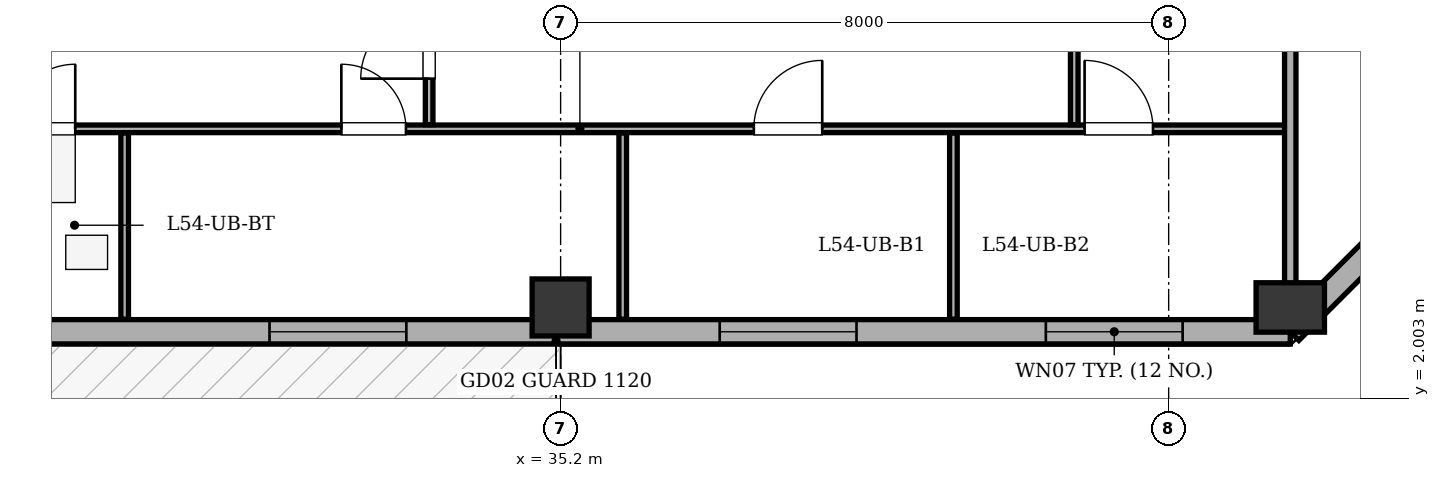
"""IFC4 building model, lengths in metres.
Left out: names, types, materials, properties, quantities, classifications, styles, units other than length and angle.
Written with IfcOpenShell. Run it as: python <this file> out.ifc"""

import sys

from ifc_helpers import new_model, si_unit, direction, frame, frame_2d, origin, origin_2d, place, context, subcontext, project, spatial, rectangle, extrude, element, fill, save


model = new_model("IFC4")
c1 = context("Model", 3, precision=1e-05, world=origin(), true_north=direction((0.0, 1.0)))
c2 = subcontext(c1, "Body", "Model", "MODEL_VIEW")
j1 = project(units=[si_unit("LENGTHUNIT", "METRE"), si_unit("PLANEANGLEUNIT", "RADIAN")], contexts=[c1])
p1 = place(None, origin())
s1 = spatial("IfcSite", under=j1, at=p1, CompositionType="ELEMENT")
p2 = place(p1, origin())
s2 = spatial("IfcBuilding", under=s1, at=p2, CompositionType="ELEMENT")
p3 = place(p2, frame((0.0, 0.0, 210.9)))
s3 = spatial("IfcBuildingStorey", under=s2, at=p3, CompositionType="ELEMENT", Elevation=210.9)
p4 = place(p3, frame((35.2, 3.2, 0.0), z_axis=(0.0, 0.0, 1.0), x_axis=(1.0, 0.0, 0.0)))
e1 = element("IfcColumn", 1, at=p4, inside=s3, PredefinedType="COLUMN", context=c2, shape_type="SweptSolid", body=[
    extrude(rectangle(XDim=0.75, YDim=0.75, at=origin_2d()), origin(), (0.0, 0.0, 1.0), 3.4),
])
p5 = place(p3, frame((44.8, 3.2, 0.0), z_axis=(0.0, 0.0, 1.0), x_axis=(1.0, 0.0, 0.0)))
e2 = element("IfcColumn", 2, at=p5, inside=s3, PredefinedType="COLUMN", context=c2, shape_type="SweptSolid", body=[
    extrude(rectangle(XDim=0.65, YDim=0.9, at=origin_2d()), origin(), (0.0, 0.0, 1.0), 3.4),
])
p6 = place(p3, frame((44.8, 2.88, 0.0), z_axis=(0.0, 0.0, 1.0), x_axis=(-1.0, 0.0, 0.0)))
e3 = element("IfcWall", 3, at=p6, inside=s3, PredefinedType="STANDARD", context=c2, shape_type="SweptSolid", body=[
    extrude(rectangle(XDim=36.0, YDim=0.32, at=frame_2d((18.0, 0.0))), origin(), (0.0, 0.0, 1.0), 2.725),
])
p7 = place(p6, frame((20.1, 0.0, 0.0)))
e4 = element("IfcOpeningElement", 4, at=p7, cuts=e3, PredefinedType="OPENING", context=c2, shape_type="SweptSolid", body=[
    extrude(rectangle(XDim=1.0, YDim=2.02, at=frame_2d((0.5, 1.01))), frame((0.0, 0.17, 0.0), z_axis=(0.0, -1.0, 0.0), x_axis=(1.0, 0.0, 0.0)), (0.0, 0.0, 1.0), 0.34),
])
p8 = place(p6, frame((1.416, 0.0, 0.75)))
e5 = element("IfcOpeningElement", 5, at=p8, cuts=e3, PredefinedType="OPENING", context=c2, shape_type="SweptSolid", body=[
    extrude(rectangle(XDim=1.8, YDim=1.7, at=frame_2d((0.9, 0.85))), frame((0.0, 0.17, 0.0), z_axis=(0.0, -1.0, 0.0), x_axis=(1.0, 0.0, 0.0)), (0.0, 0.0, 1.0), 0.34),
])
p9 = place(p6, frame((5.707, 0.0, 0.75)))
e6 = element("IfcOpeningElement", 6, at=p9, cuts=e3, PredefinedType="OPENING", context=c2, shape_type="SweptSolid", body=[
    extrude(rectangle(XDim=1.8, YDim=1.7, at=frame_2d((0.9, 0.85))), frame((0.0, 0.17, 0.0), z_axis=(0.0, -1.0, 0.0), x_axis=(1.0, 0.0, 0.0)), (0.0, 0.0, 1.0), 0.34),
])
p10 = place(p6, frame((11.63, 0.0, 0.75)))
e7 = element("IfcOpeningElement", 7, at=p10, cuts=e3, PredefinedType="OPENING", context=c2, shape_type="SweptSolid", body=[
    extrude(rectangle(XDim=1.8, YDim=1.7, at=frame_2d((0.9, 0.85))), frame((0.0, 0.17, 0.0), z_axis=(0.0, -1.0, 0.0), x_axis=(1.0, 0.0, 0.0)), (0.0, 0.0, 1.0), 0.34),
])
p11 = place(p6, frame((27.712, 0.0, 0.75)))
e8 = element("IfcOpeningElement", 8, at=p11, cuts=e3, PredefinedType="OPENING", context=c2, shape_type="SweptSolid", body=[
    extrude(rectangle(XDim=1.8, YDim=1.7, at=frame_2d((0.9, 0.85))), frame((0.0, 0.17, 0.0), z_axis=(0.0, -1.0, 0.0), x_axis=(1.0, 0.0, 0.0)), (0.0, 0.0, 1.0), 0.34),
])
p12 = place(p6, frame((22.367, 0.0, 0.75)))
e9 = element("IfcOpeningElement", 9, at=p12, cuts=e3, PredefinedType="OPENING", context=c2, shape_type="SweptSolid", body=[
    extrude(rectangle(XDim=0.75, YDim=1.45, at=frame_2d((0.375, 0.725))), frame((0.0, 0.17, 0.0), z_axis=(0.0, -1.0, 0.0), x_axis=(1.0, 0.0, 0.0)), (0.0, 0.0, 1.0), 0.34),
])
p13 = place(p3, frame((49.12, 7.2, 0.0), z_axis=(0.0, 0.0, 1.0), x_axis=(-0.707106781187, -0.707106781187, 0.0)))
e10 = element("IfcWall", 10, at=p13, inside=s3, PredefinedType="STANDARD", context=c2, shape_type="SweptSolid", body=[
    extrude(rectangle(XDim=6.11, YDim=0.32, at=frame_2d((3.055, 0.0))), origin(), (0.0, 0.0, 1.0), 2.725),
])
p14 = place(p13, frame((2.355, 0.0, 0.75)))
e11 = element("IfcOpeningElement", 11, at=p14, cuts=e10, PredefinedType="OPENING", context=c2, shape_type="SweptSolid", body=[
    extrude(rectangle(XDim=1.4, YDim=1.65, at=frame_2d((0.7, 0.825))), frame((0.0, 0.17, 0.0), z_axis=(0.0, -1.0, 0.0), x_axis=(1.0, 0.0, 0.0)), (0.0, 0.0, 1.0), 0.34),
])
p15 = place(p3, frame((27.314, 5.55, 0.0), z_axis=(0.0, 0.0, 1.0), x_axis=(1.0, 0.0, 0.0)))
e12 = element("IfcWall", 12, at=p15, inside=s3, PredefinedType="PARTITIONING", context=c2, shape_type="SweptSolid", body=[
    extrude(rectangle(XDim=17.526, YDim=0.1, at=frame_2d((8.763, 0.0))), origin(), (0.0, 0.0, 1.0), 3.1),
])
p16 = place(p15, frame((0.65, 0.0, 0.0)))
e13 = element("IfcOpeningElement", 13, at=p16, cuts=e12, PredefinedType="OPENING", context=c2, shape_type="SweptSolid", body=[
    extrude(rectangle(XDim=0.85, YDim=2.05, at=frame_2d((0.425, 1.025))), frame((0.0, 0.06, 0.0), z_axis=(0.0, -1.0, 0.0), x_axis=(1.0, 0.0, 0.0)), (0.0, 0.0, 1.0), 0.12),
])
p17 = place(p15, frame((5.001, 0.0, 0.0)))
e14 = element("IfcOpeningElement", 14, at=p17, cuts=e12, PredefinedType="OPENING", context=c2, shape_type="SweptSolid", body=[
    extrude(rectangle(XDim=0.85, YDim=2.05, at=frame_2d((0.425, 1.025))), frame((0.0, 0.06, 0.0), z_axis=(0.0, -1.0, 0.0), x_axis=(1.0, 0.0, 0.0)), (0.0, 0.0, 1.0), 0.12),
])
p18 = place(p15, frame((10.428, 0.0, 0.0)))
e15 = element("IfcOpeningElement", 15, at=p18, cuts=e12, PredefinedType="OPENING", context=c2, shape_type="SweptSolid", body=[
    extrude(rectangle(XDim=0.9, YDim=2.05, at=frame_2d((0.45, 1.025))), frame((0.0, 0.06, 0.0), z_axis=(0.0, -1.0, 0.0), x_axis=(1.0, 0.0, 0.0)), (0.0, 0.0, 1.0), 0.12),
])
p19 = place(p15, frame((14.78, 0.0, 0.0)))
e16 = element("IfcOpeningElement", 16, at=p19, cuts=e12, PredefinedType="OPENING", context=c2, shape_type="SweptSolid", body=[
    extrude(rectangle(XDim=0.9, YDim=2.05, at=frame_2d((0.45, 1.025))), frame((0.0, 0.06, 0.0), z_axis=(0.0, -1.0, 0.0), x_axis=(1.0, 0.0, 0.0)), (0.0, 0.0, 1.0), 0.12),
])
p20 = place(p3, frame((41.958, 5.605, 0.0), z_axis=(0.0, 0.0, 1.0), x_axis=(0.0, 1.0, 0.0)))
e17 = element("IfcWall", 17, at=p20, inside=s3, PredefinedType="PARTITIONING", context=c2, shape_type="SweptSolid", body=[
    extrude(rectangle(XDim=12.695, YDim=0.1, at=frame_2d((6.348, 0.0))), origin(), (0.0, 0.0, 1.0), 2.725),
])
p21 = place(p20, frame((5.91, 0.0, 0.0)))
e18 = element("IfcOpeningElement", 18, at=p21, cuts=e17, PredefinedType="OPENING", context=c2, shape_type="SweptSolid", body=[
    extrude(rectangle(XDim=0.9, YDim=2.05, at=frame_2d((0.45, 1.025))), frame((0.0, 0.06, 0.0), z_axis=(0.0, -1.0, 0.0), x_axis=(1.0, 0.0, 0.0)), (0.0, 0.0, 1.0), 0.12),
])
p22 = place(p3, frame((33.47, 5.605, 0.0), z_axis=(0.0, 0.0, 1.0), x_axis=(0.0, 1.0, 0.0)))
e19 = element("IfcWall", 19, at=p22, inside=s3, PredefinedType="PARTITIONING", context=c2, shape_type="SweptSolid", body=[
    extrude(rectangle(XDim=12.695, YDim=0.1, at=frame_2d((6.348, 0.0))), origin(), (0.0, 0.0, 1.0), 2.725),
])
p23 = place(p22, frame((0.605, 0.0, 0.0)))
e20 = element("IfcOpeningElement", 20, at=p23, cuts=e19, PredefinedType="OPENING", context=c2, shape_type="SweptSolid", body=[
    extrude(rectangle(XDim=0.9, YDim=2.05, at=frame_2d((0.45, 1.025))), frame((0.0, 0.06, 0.0), z_axis=(0.0, -1.0, 0.0), x_axis=(1.0, 0.0, 0.0)), (0.0, 0.0, 1.0), 0.12),
])
for number, where, z_axis, x_axis in (
    (21, (29.464, 3.045, 0.0), (0.0, 0.0, 1.0), (0.0, 1.0, 0.0)),
    (22, (36.017, 3.045, 0.0), (0.0, 0.0, 1.0), (0.0, 1.0, 0.0)),
):
    element("IfcWall", number, at=place(p3, frame(where, z_axis=z_axis, x_axis=x_axis)), inside=s3, PredefinedType="PARTITIONING", context=c2, shape_type="SweptSolid", body=[
        extrude(rectangle(XDim=2.45, YDim=0.1, at=frame_2d((1.225, 0.0))), origin(), (0.0, 0.0, 1.0), 3.1),
    ])
p24 = place(p3, frame((40.368, 3.045, 0.0), z_axis=(0.0, 0.0, 1.0), x_axis=(0.0, 1.0, 0.0)))
e23 = element("IfcWall", 23, at=p24, inside=s3, PredefinedType="PARTITIONING", context=c2, shape_type="SweptSolid", body=[
    extrude(rectangle(XDim=2.45, YDim=0.1, at=frame_2d((1.225, 0.0))), origin(), (0.0, 0.0, 1.0), 2.725),
])
p25 = place(p3, frame((44.8, 3.045, 0.0), z_axis=(0.0, 0.0, 1.0), x_axis=(0.0, 1.0, 0.0)))
e24 = element("IfcWall", 24, at=p25, inside=s3, PredefinedType="PARTITIONING", context=c2, shape_type="SweptSolid", body=[
    extrude(rectangle(XDim=15.255, YDim=0.15, at=frame_2d((7.627, 0.0))), origin(), (0.0, 0.0, 1.0), 3.1),
])
p26 = place(p8, origin())
e25 = element("IfcWindow", 25, at=p26, inside=s3, PartitioningType="SINGLE_PANEL", PredefinedType="WINDOW", context=c2, shape_type="SweptSolid", body=[
    extrude(rectangle(XDim=1.8, YDim=1.7, at=frame_2d((0.9, 0.85))), frame((0.0, -0.01, 0.0), z_axis=(0.0, -1.0, 0.0), x_axis=(1.0, 0.0, 0.0)), (0.0, 0.0, 1.0), 0.06),
])
fill(e5, e25)
p27 = place(p9, origin())
e26 = element("IfcWindow", 26, at=p27, inside=s3, PartitioningType="SINGLE_PANEL", PredefinedType="WINDOW", context=c2, shape_type="SweptSolid", body=[
    extrude(rectangle(XDim=1.8, YDim=1.7, at=frame_2d((0.9, 0.85))), frame((0.0, -0.01, 0.0), z_axis=(0.0, -1.0, 0.0), x_axis=(1.0, 0.0, 0.0)), (0.0, 0.0, 1.0), 0.06),
])
fill(e6, e26)
p28 = place(p10, origin())
e27 = element("IfcWindow", 27, at=p28, inside=s3, PartitioningType="SINGLE_PANEL", PredefinedType="WINDOW", context=c2, shape_type="SweptSolid", body=[
    extrude(rectangle(XDim=1.8, YDim=1.7, at=frame_2d((0.9, 0.85))), frame((0.0, -0.01, 0.0), z_axis=(0.0, -1.0, 0.0), x_axis=(1.0, 0.0, 0.0)), (0.0, 0.0, 1.0), 0.06),
])
fill(e7, e27)
p29 = place(p23, origin())
e28 = element("IfcDoor", 28, at=p29, inside=s3, OperationType="SINGLE_SWING_LEFT", PredefinedType="DOOR", context=c2, shape_type="SweptSolid", body=[
    extrude(rectangle(XDim=0.9, YDim=2.05, at=frame_2d((0.45, 1.025))), frame((0.0, 0.025, 0.0), z_axis=(0.0, -1.0, 0.0), x_axis=(1.0, 0.0, 0.0)), (0.0, 0.0, 1.0), 0.05),
])
fill(e20, e28)
p30 = place(p16, origin())
e29 = element("IfcDoor", 29, at=p30, inside=s3, OperationType="SINGLE_SWING_RIGHT", PredefinedType="DOOR", context=c2, shape_type="SweptSolid", body=[
    extrude(rectangle(XDim=0.85, YDim=2.05, at=frame_2d((0.425, 1.025))), frame((0.0, 0.025, 0.0), z_axis=(0.0, -1.0, 0.0), x_axis=(1.0, 0.0, 0.0)), (0.0, 0.0, 1.0), 0.05),
])
fill(e13, e29)
p31 = place(p17, origin())
e30 = element("IfcDoor", 30, at=p31, inside=s3, OperationType="SINGLE_SWING_LEFT", PredefinedType="DOOR", context=c2, shape_type="SweptSolid", body=[
    extrude(rectangle(XDim=0.85, YDim=2.05, at=frame_2d((0.425, 1.025))), frame((0.0, 0.025, 0.0), z_axis=(0.0, -1.0, 0.0), x_axis=(1.0, 0.0, 0.0)), (0.0, 0.0, 1.0), 0.05),
])
fill(e14, e30)
p32 = place(p18, origin())
e31 = element("IfcDoor", 31, at=p32, inside=s3, OperationType="SINGLE_SWING_RIGHT", PredefinedType="DOOR", context=c2, shape_type="SweptSolid", body=[
    extrude(rectangle(XDim=0.9, YDim=2.05, at=frame_2d((0.45, 1.025))), frame((0.0, 0.025, 0.0), z_axis=(0.0, -1.0, 0.0), x_axis=(1.0, 0.0, 0.0)), (0.0, 0.0, 1.0), 0.05),
])
fill(e15, e31)
p33 = place(p19, origin())
e32 = element("IfcDoor", 32, at=p33, inside=s3, OperationType="SINGLE_SWING_LEFT", PredefinedType="DOOR", context=c2, shape_type="SweptSolid", body=[
    extrude(rectangle(XDim=0.9, YDim=2.05, at=frame_2d((0.45, 1.025))), frame((0.0, 0.025, 0.0), z_axis=(0.0, -1.0, 0.0), x_axis=(1.0, 0.0, 0.0)), (0.0, 0.0, 1.0), 0.05),
])
fill(e16, e32)
save(model, sys.argv[1])
